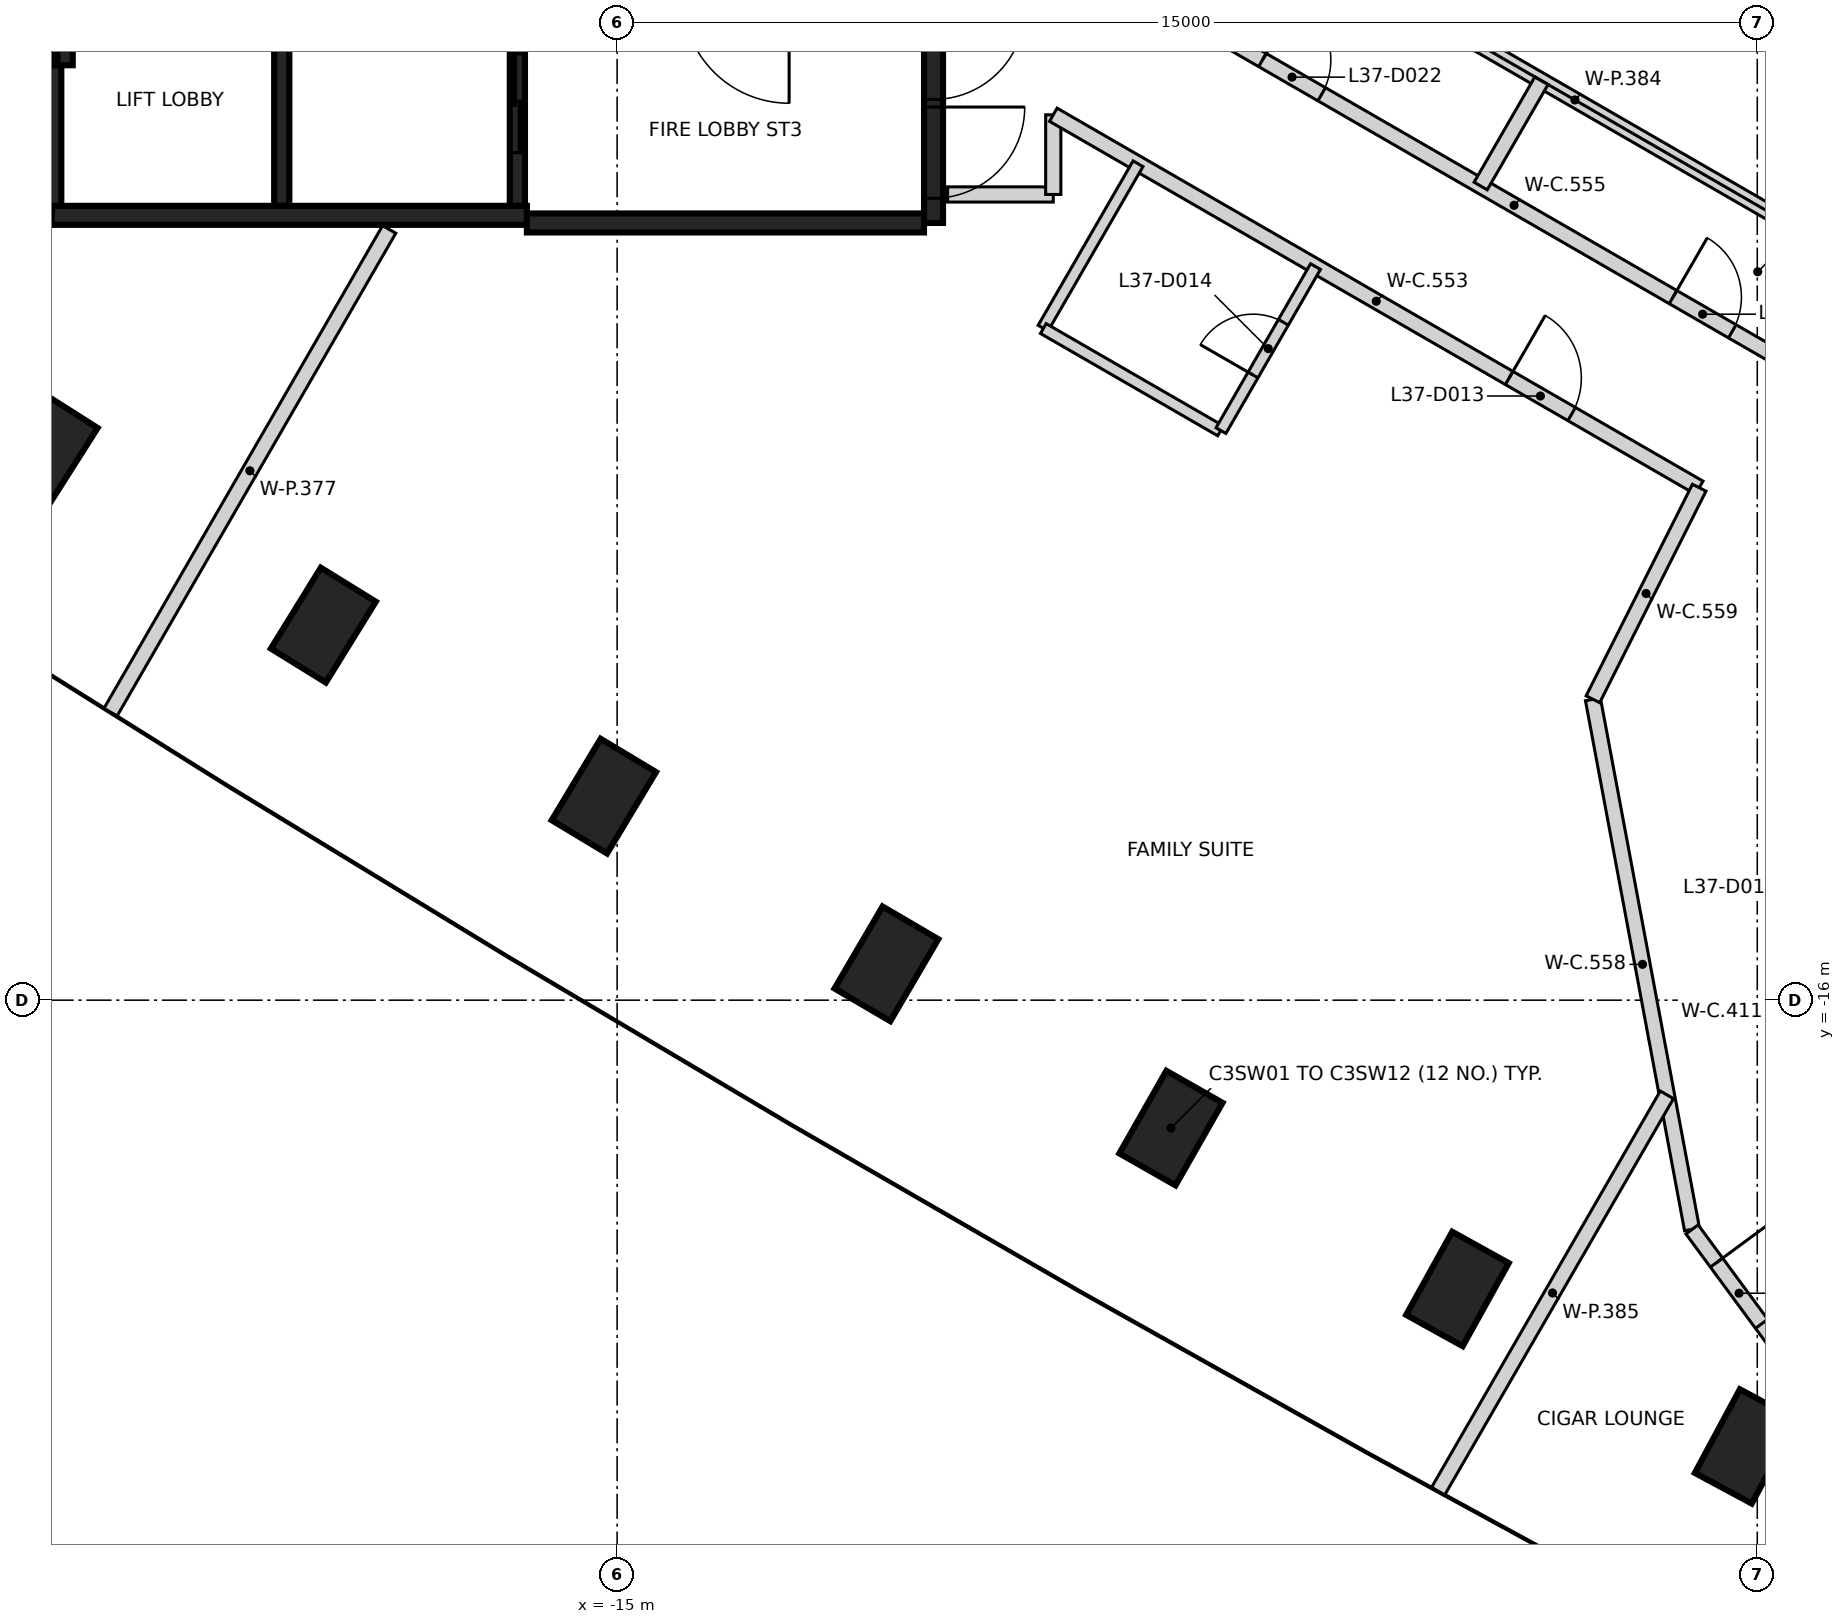
"""IFC4 building model, lengths in metres.
Left out: names, types, materials, properties, quantities, classifications, styles, units other than length and angle.
Written with IfcOpenShell. Run it as: python <this file> out.ifc"""

import sys

from ifc_helpers import new_model, si_unit, direction, frame, frame_2d, origin, origin_2d, place, context, subcontext, project, spatial, rectangle, extrude, element, fill, save


model = new_model("IFC4")
c1 = context("Model", 3, precision=1e-05, world=origin(), true_north=direction((0.0, 1.0)))
c2 = subcontext(c1, "Body", "Model", "MODEL_VIEW")
j1 = project(units=[si_unit("LENGTHUNIT", "METRE"), si_unit("PLANEANGLEUNIT", "RADIAN")], contexts=[c1])
p1 = place(None, origin())
s1 = spatial("IfcSite", under=j1, at=p1, CompositionType="ELEMENT")
p2 = place(p1, origin())
s2 = spatial("IfcBuilding", under=s1, at=p2, CompositionType="ELEMENT")
p3 = place(p2, frame((0.0, 0.0, 150.4)))
s3 = spatial("IfcBuildingStorey", under=s2, at=p3, CompositionType="ELEMENT", Elevation=150.4)
for number, where, z_axis, x_axis in (
    (1, (-22.529, -8.772, -0.4), (0.0, 0.0, 1.0), (0.536, 0.844, 0.0)),
    (2, (-18.865, -11.066, -0.4), (0.0, 0.0, 1.0), (0.526, 0.851, 0.0)),
    (3, (-15.175, -13.316, -0.4), (0.0, 0.0, 1.0), (0.515, 0.857, 0.0)),
    (4, (-11.457, -15.522, -0.4), (0.0, 0.0, 1.0), (0.505, 0.863, 0.0)),
    (5, (-7.714, -17.683, -0.4), (0.0, 0.0, 1.0), (0.495, 0.869, 0.0)),
    (6, (-3.945, -19.8, -0.4), (0.0, 0.0, 1.0), (0.485, 0.875, 0.0)),
    (7, (-0.151, -21.871, -0.4), (0.0, 0.0, 1.0), (0.474, 0.881, 0.0)),
):
    element("IfcColumn", number, at=place(p3, frame(where, z_axis=z_axis, x_axis=x_axis)), inside=s3, PredefinedType="COLUMN", context=c2, shape_type="SweptSolid", body=[
        extrude(rectangle(XDim=1.25, YDim=0.85, at=origin_2d()), origin(), (0.0, 0.0, 1.0), 3.6),
    ])
p4 = place(p3, frame((-10.837, 5.775, 0.0), z_axis=(0.0, 0.0, 1.0), x_axis=(0.0, -1.0, 0.0)))
e8 = element("IfcWall", 8, at=p4, inside=s3, PredefinedType="SHEAR", context=c2, shape_type="SweptSolid", body=[
    extrude(rectangle(XDim=11.55, YDim=0.25, at=frame_2d((5.775, 0.0))), origin(), (0.0, 0.0, 1.0), 3.2),
])
p5 = place(p4, frame((10.025, 0.0, 0.0)))
e9 = element("IfcOpeningElement", 9, at=p5, cuts=e8, PredefinedType="OPENING", context=c2, shape_type="SweptSolid", body=[
    extrude(rectangle(XDim=1.2, YDim=2.1, at=frame_2d((0.6, 1.05))), frame((0.0, 0.135, 0.0), z_axis=(0.0, -1.0, 0.0), x_axis=(1.0, 0.0, 0.0)), (0.0, 0.0, 1.0), 0.27),
])
p6 = place(p4, frame((8.725, 0.0, 0.0)))
e10 = element("IfcOpeningElement", 10, at=p6, cuts=e8, PredefinedType="OPENING", context=c2, shape_type="SweptSolid", body=[
    extrude(rectangle(XDim=1.2, YDim=2.1, at=frame_2d((0.6, 1.05))), frame((0.0, 0.135, 0.0), z_axis=(0.0, -1.0, 0.0), x_axis=(1.0, 0.0, 0.0)), (0.0, 0.0, 1.0), 0.27),
])
p7 = place(p3, frame((-16.187, -5.675, 0.0), z_axis=(0.0, 0.0, 1.0), x_axis=(-1.0, 0.0, 0.0)))
e11 = element("IfcWall", 11, at=p7, inside=s3, PredefinedType="SHEAR", context=c2, shape_type="SweptSolid", body=[
    extrude(rectangle(XDim=6.25, YDim=0.25, at=frame_2d((3.125, 0.0))), origin(), (0.0, 0.0, 1.0), 3.2),
])
p8 = place(p3, frame((-10.963, -5.775, 0.0), z_axis=(0.0, 0.0, 1.0), x_axis=(-1.0, 0.0, 0.0)))
e12 = element("IfcWall", 12, at=p8, inside=s3, PredefinedType="SHEAR", context=c2, shape_type="SweptSolid", body=[
    extrude(rectangle(XDim=5.225, YDim=0.25, at=frame_2d((2.612, 0.0))), origin(), (0.0, 0.0, 1.0), 3.2),
])
p9 = place(p3, frame((-22.437, -5.55, 0.0), z_axis=(0.0, 0.0, 1.0), x_axis=(0.0, 1.0, 0.0)))
e13 = element("IfcWall", 13, at=p9, inside=s3, PredefinedType="SHEAR", context=c2, shape_type="SweptSolid", body=[
    extrude(rectangle(XDim=1.849, YDim=0.25, at=frame_2d((0.925, 0.0))), origin(), (0.0, 0.0, 1.0), 3.2),
])
p10 = place(p3, frame((-22.262, 2.4, 0.0), z_axis=(0.0, 0.0, 1.0), x_axis=(0.0, -1.0, 0.0)))
e14 = element("IfcWall", 14, at=p10, inside=s3, PredefinedType="SHEAR", context=c2, shape_type="SweptSolid", body=[
    extrude(rectangle(XDim=6.1, YDim=0.2, at=frame_2d((3.05, 0.0))), origin(), (0.0, 0.0, 1.0), 3.2),
])
p11 = place(p3, frame((-16.312, -2.898, 0.0), z_axis=(0.0, 0.0, 1.0), x_axis=(0.0, -1.0, 0.0)))
e15 = element("IfcWall", 15, at=p11, inside=s3, PredefinedType="SHEAR", context=c2, shape_type="SweptSolid", body=[
    extrude(rectangle(XDim=2.651, YDim=0.2, at=frame_2d((1.325, 0.0))), origin(), (0.0, 0.0, 1.0), 3.2),
])
p12 = place(p11, frame((0.652, 0.0, 0.0)))
e16 = element("IfcOpeningElement", 16, at=p12, cuts=e15, PredefinedType="OPENING", context=c2, shape_type="SweptSolid", body=[
    extrude(rectangle(XDim=1.3, YDim=2.1, at=frame_2d((0.65, 1.05))), frame((0.0, 0.11, 0.0), z_axis=(0.0, -1.0, 0.0), x_axis=(1.0, 0.0, 0.0)), (0.0, 0.0, 1.0), 0.22),
])
p13 = place(p3, frame((-19.412, -5.549, 0.0), z_axis=(0.0, 0.0, 1.0), x_axis=(0.0, 1.0, 0.0)))
e17 = element("IfcWall", 17, at=p13, inside=s3, PredefinedType="SHEAR", context=c2, shape_type="SweptSolid", body=[
    extrude(rectangle(XDim=2.651, YDim=0.2, at=frame_2d((1.325, 0.0))), origin(), (0.0, 0.0, 1.0), 3.2),
])
p14 = place(p3, frame((-10.652, -5.4, 0.0), z_axis=(0.0, 0.0, 1.0), x_axis=(1.0, 0.0, 0.0)))
e18 = element("IfcWall", 18, at=p14, inside=s3, PredefinedType="PARTITIONING", context=c2, shape_type="SweptSolid", body=[
    extrude(rectangle(XDim=1.39, YDim=0.2, at=frame_2d((0.695, 0.0))), origin(), (0.0, 0.0, 1.0), 3.2),
])
p15 = place(p3, frame((-9.262, -5.4, 0.0), z_axis=(0.0, 0.0, 1.0), x_axis=(0.0, 1.0, 0.0)))
e19 = element("IfcWall", 19, at=p15, inside=s3, PredefinedType="PARTITIONING", context=c2, shape_type="SweptSolid", body=[
    extrude(rectangle(XDim=1.048, YDim=0.2, at=frame_2d((0.524, 0.0))), origin(), (0.0, 0.0, 1.0), 3.2),
])
p16 = place(p3, frame((-9.261, -4.351, 0.0), z_axis=(0.0, 0.0, 1.0), x_axis=(0.865985037707, -0.500069909581, 0.0)))
e20 = element("IfcWall", 20, at=p16, inside=s3, PredefinedType="PARTITIONING", context=c2, shape_type="SweptSolid", body=[
    extrude(rectangle(XDim=9.812, YDim=0.2, at=frame_2d((4.906, 0.0))), origin(), (0.0, 0.0, 1.0), 3.2),
])
p17 = place(p16, frame((6.925, 0.0, 0.0)))
e21 = element("IfcOpeningElement", 21, at=p17, cuts=e20, PredefinedType="OPENING", context=c2, shape_type="SweptSolid", body=[
    extrude(rectangle(XDim=0.95, YDim=2.1, at=frame_2d((0.475, 1.05))), frame((0.0, 0.11, 0.0), z_axis=(0.0, -1.0, 0.0), x_axis=(1.0, 0.0, 0.0)), (0.0, 0.0, 1.0), 0.22),
])
p18 = place(p3, frame((-8.612, -2.418, 0.0), z_axis=(0.0, 0.0, 1.0), x_axis=(0.866023916678, -0.500002575735, 0.0)))
e22 = element("IfcWall", 22, at=p18, inside=s3, PredefinedType="PARTITIONING", context=c2, shape_type="SweptSolid", body=[
    extrude(rectangle(XDim=12.499, YDim=0.2, at=frame_2d((6.249, 0.0))), origin(), (0.0, 0.0, 1.0), 3.2),
])
p19 = place(p18, frame((2.427, 0.0, 0.0)))
e23 = element("IfcOpeningElement", 23, at=p19, cuts=e22, PredefinedType="OPENING", context=c2, shape_type="SweptSolid", body=[
    extrude(rectangle(XDim=0.9, YDim=2.1, at=frame_2d((0.45, 1.05))), frame((0.0, 0.11, 0.0), z_axis=(0.0, -1.0, 0.0), x_axis=(1.0, 0.0, 0.0)), (0.0, 0.0, 1.0), 0.22),
])
p20 = place(p18, frame((8.665, 0.0, 0.0)))
e24 = element("IfcOpeningElement", 24, at=p20, cuts=e22, PredefinedType="OPENING", context=c2, shape_type="SweptSolid", body=[
    extrude(rectangle(XDim=0.9, YDim=2.1, at=frame_2d((0.45, 1.05))), frame((0.0, 0.11, 0.0), z_axis=(0.0, -1.0, 0.0), x_axis=(1.0, 0.0, 0.0)), (0.0, 0.0, 1.0), 0.22),
])
p21 = place(p3, frame((-2.162, -12.042, 0.0), z_axis=(0.0, 0.0, 1.0), x_axis=(0.18377734651, -0.982967897192, 0.0)))
e25 = element("IfcWall", 25, at=p21, inside=s3, PredefinedType="PARTITIONING", context=c2, shape_type="SweptSolid", body=[
    extrude(rectangle(XDim=7.094, YDim=0.2, at=frame_2d((3.547, 0.0))), origin(), (0.0, 0.0, 1.0), 3.2),
])
p22 = place(p3, frame((-2.162, -12.041, 0.0), z_axis=(0.0, 0.0, 1.0), x_axis=(0.448937335771, 0.893563242614, 0.0)))
e26 = element("IfcWall", 26, at=p22, inside=s3, PredefinedType="PARTITIONING", context=c2, shape_type="SweptSolid", body=[
    extrude(rectangle(XDim=3.115, YDim=0.2, at=frame_2d((1.557, 0.0))), origin(), (0.0, 0.0, 1.0), 3.2),
])
p23 = place(p3, frame((-0.858, -19.016, 0.0), z_axis=(0.0, 0.0, 1.0), x_axis=(0.593123867414, -0.805111220829, 0.0)))
e27 = element("IfcWall", 27, at=p23, inside=s3, PredefinedType="PARTITIONING", context=c2, shape_type="SweptSolid", body=[
    extrude(rectangle(XDim=2.77, YDim=0.2, at=frame_2d((1.385, 0.0))), origin(), (0.0, 0.0, 1.0), 3.2),
])
p24 = place(p23, frame((0.542, 0.0, 0.0)))
e28 = element("IfcOpeningElement", 28, at=p24, cuts=e27, PredefinedType="OPENING", context=c2, shape_type="SweptSolid", body=[
    extrude(rectangle(XDim=1.0, YDim=2.1, at=frame_2d((0.5, 1.05))), frame((0.0, 0.11, 0.0), z_axis=(0.0, -1.0, 0.0), x_axis=(1.0, 0.0, 0.0)), (0.0, 0.0, 1.0), 0.22),
])
p25 = place(p3, frame((-21.664, -12.21, 0.0), z_axis=(0.0, 0.0, 1.0), x_axis=(0.499938621367, 0.866060837855, 0.0)))
e29 = element("IfcWall", 29, at=p25, inside=s3, PredefinedType="PARTITIONING", context=c2, shape_type="SweptSolid", body=[
    extrude(rectangle(XDim=7.333, YDim=0.2, at=frame_2d((3.666, 0.0))), origin(), (0.0, 0.0, 1.0), 2.3),
])
p26 = place(p3, frame((-8.0, -0.924, 0.0), z_axis=(0.0, 0.0, 1.0), x_axis=(0.866062358179, -0.499935987647, 0.0)))
e30 = element("IfcWall", 30, at=p26, inside=s3, PredefinedType="PARTITIONING", context=c2, shape_type="SweptSolid", body=[
    extrude(rectangle(XDim=12.932, YDim=0.2, at=frame_2d((6.466, 0.0))), origin(), (0.0, 0.0, 1.0), 2.3),
])
p27 = place(p3, frame((-4.198, -22.459, 0.0), z_axis=(0.0, 0.0, 1.0), x_axis=(0.499899163109, 0.866083614164, 0.0)))
e31 = element("IfcWall", 31, at=p27, inside=s3, PredefinedType="PARTITIONING", context=c2, shape_type="SweptSolid", body=[
    extrude(rectangle(XDim=6.02, YDim=0.2, at=frame_2d((3.01, 0.0))), origin(), (0.0, 0.0, 1.0), 2.3),
])
p28 = place(p3, frame((-3.639, -5.289, 0.0), z_axis=(0.0, 0.0, 1.0), x_axis=(0.49981490623, 0.866132241352, 0.0)))
e32 = element("IfcWall", 32, at=p28, inside=s3, PredefinedType="PARTITIONING", context=c2, shape_type="SweptSolid", body=[
    extrude(rectangle(XDim=1.6, YDim=0.2, at=frame_2d((0.8, 0.0))), origin(), (0.0, 0.0, 1.0), 2.3),
])
p29 = place(p3, frame((-9.396, -7.159, 0.0), z_axis=(0.0, 0.0, 1.0), x_axis=(0.500091929049, 0.865972322018, 0.0)))
e33 = element("IfcWall", 33, at=p29, inside=s3, PredefinedType="PARTITIONING", context=c2, shape_type="SweptSolid", body=[
    extrude(rectangle(XDim=2.498, YDim=0.15, at=frame_2d((1.249, 0.0))), origin(), (0.0, 0.0, 1.0), 3.2),
])
p30 = place(p3, frame((-9.393, -7.164, 0.0), z_axis=(0.0, 0.0, 1.0), x_axis=(0.866098020528, -0.499874203012, 0.0)))
e34 = element("IfcWall", 34, at=p30, inside=s3, PredefinedType="PARTITIONING", context=c2, shape_type="SweptSolid", body=[
    extrude(rectangle(XDim=2.693, YDim=0.15, at=frame_2d((1.346, 0.0))), origin(), (0.0, 0.0, 1.0), 3.2),
])
p31 = place(p3, frame((-7.056, -8.507, 0.0), z_axis=(0.0, 0.0, 1.0), x_axis=(0.499397145068, 0.866373182582, 0.0)))
e35 = element("IfcWall", 35, at=p31, inside=s3, PredefinedType="PARTITIONING", context=c2, shape_type="SweptSolid", body=[
    extrude(rectangle(XDim=2.491, YDim=0.15, at=frame_2d((1.245, 0.0))), origin(), (0.0, 0.0, 1.0), 3.2),
])
p32 = place(p31, frame((0.845, 0.0, 0.0)))
e36 = element("IfcOpeningElement", 36, at=p32, cuts=e35, PredefinedType="OPENING", context=c2, shape_type="SweptSolid", body=[
    extrude(rectangle(XDim=0.8, YDim=2.1, at=frame_2d((0.4, 1.05))), frame((0.0, 0.085, 0.0), z_axis=(0.0, -1.0, 0.0), x_axis=(1.0, 0.0, 0.0)), (0.0, 0.0, 1.0), 0.17),
])
p33 = place(p12, origin())
e37 = element("IfcDoor", 37, at=p33, inside=s3, OperationType="SLIDING_TO_LEFT", PredefinedType="DOOR", context=c2, shape_type="SweptSolid", body=[
    extrude(rectangle(XDim=1.3, YDim=2.1, at=frame_2d((0.65, 1.05))), frame((0.0, 0.025, 0.0), z_axis=(0.0, -1.0, 0.0), x_axis=(1.0, 0.0, 0.0)), (0.0, 0.0, 1.0), 0.05),
])
fill(e16, e37)
p34 = place(p5, origin())
e38 = element("IfcDoor", 38, at=p34, inside=s3, OperationType="SINGLE_SWING_LEFT", PredefinedType="DOOR", context=c2, shape_type="SweptSolid", body=[
    extrude(rectangle(XDim=1.2, YDim=2.1, at=frame_2d((0.6, 1.05))), frame((0.0, 0.025, 0.0), z_axis=(0.0, -1.0, 0.0), x_axis=(1.0, 0.0, 0.0)), (0.0, 0.0, 1.0), 0.05),
])
fill(e9, e38)
p35 = place(p6, origin())
e39 = element("IfcDoor", 39, at=p35, inside=s3, OperationType="SINGLE_SWING_RIGHT", PredefinedType="DOOR", context=c2, shape_type="SweptSolid", body=[
    extrude(rectangle(XDim=1.2, YDim=2.1, at=frame_2d((0.6, 1.05))), frame((0.0, 0.025, 0.0), z_axis=(0.0, -1.0, 0.0), x_axis=(1.0, 0.0, 0.0)), (0.0, 0.0, 1.0), 0.05),
])
fill(e10, e39)
p36 = place(p17, frame((0.95, 0.0, 0.0), z_axis=(0.0, 0.0, 1.0), x_axis=(-1.0, 0.0, 0.0)))
e40 = element("IfcDoor", 40, at=p36, inside=s3, OperationType="SINGLE_SWING_LEFT", PredefinedType="DOOR", context=c2, shape_type="SweptSolid", body=[
    extrude(rectangle(XDim=0.95, YDim=2.1, at=frame_2d((0.475, 1.05))), frame((0.0, 0.025, 0.0), z_axis=(0.0, -1.0, 0.0), x_axis=(1.0, 0.0, 0.0)), (0.0, 0.0, 1.0), 0.05),
])
fill(e21, e40)
p37 = place(p32, origin())
e41 = element("IfcDoor", 41, at=p37, inside=s3, OperationType="SINGLE_SWING_LEFT", PredefinedType="DOOR", context=c2, shape_type="SweptSolid", body=[
    extrude(rectangle(XDim=0.8, YDim=2.1, at=frame_2d((0.4, 1.05))), frame((0.0, 0.025, 0.0), z_axis=(0.0, -1.0, 0.0), x_axis=(1.0, 0.0, 0.0)), (0.0, 0.0, 1.0), 0.05),
])
fill(e36, e41)
p38 = place(p24, frame((1.0, 0.0, 0.0), z_axis=(0.0, 0.0, 1.0), x_axis=(-1.0, 0.0, 0.0)))
e42 = element("IfcDoor", 42, at=p38, inside=s3, OperationType="SINGLE_SWING_LEFT", PredefinedType="DOOR", context=c2, shape_type="SweptSolid", body=[
    extrude(rectangle(XDim=1.0, YDim=2.1, at=frame_2d((0.5, 1.05))), frame((0.0, 0.025, 0.0), z_axis=(0.0, -1.0, 0.0), x_axis=(1.0, 0.0, 0.0)), (0.0, 0.0, 1.0), 0.05),
])
fill(e28, e42)
p39 = place(p19, origin())
e43 = element("IfcDoor", 43, at=p39, inside=s3, OperationType="SINGLE_SWING_LEFT", PredefinedType="DOOR", context=c2, shape_type="SweptSolid", body=[
    extrude(rectangle(XDim=0.9, YDim=2.1, at=frame_2d((0.45, 1.05))), frame((0.0, 0.025, 0.0), z_axis=(0.0, -1.0, 0.0), x_axis=(1.0, 0.0, 0.0)), (0.0, 0.0, 1.0), 0.05),
])
fill(e23, e43)
p40 = place(p20, origin())
e44 = element("IfcDoor", 44, at=p40, inside=s3, OperationType="SINGLE_SWING_LEFT", PredefinedType="DOOR", context=c2, shape_type="SweptSolid", body=[
    extrude(rectangle(XDim=0.9, YDim=2.1, at=frame_2d((0.45, 1.05))), frame((0.0, 0.025, 0.0), z_axis=(0.0, -1.0, 0.0), x_axis=(1.0, 0.0, 0.0)), (0.0, 0.0, 1.0), 0.05),
])
fill(e24, e44)
save(model, sys.argv[1])
